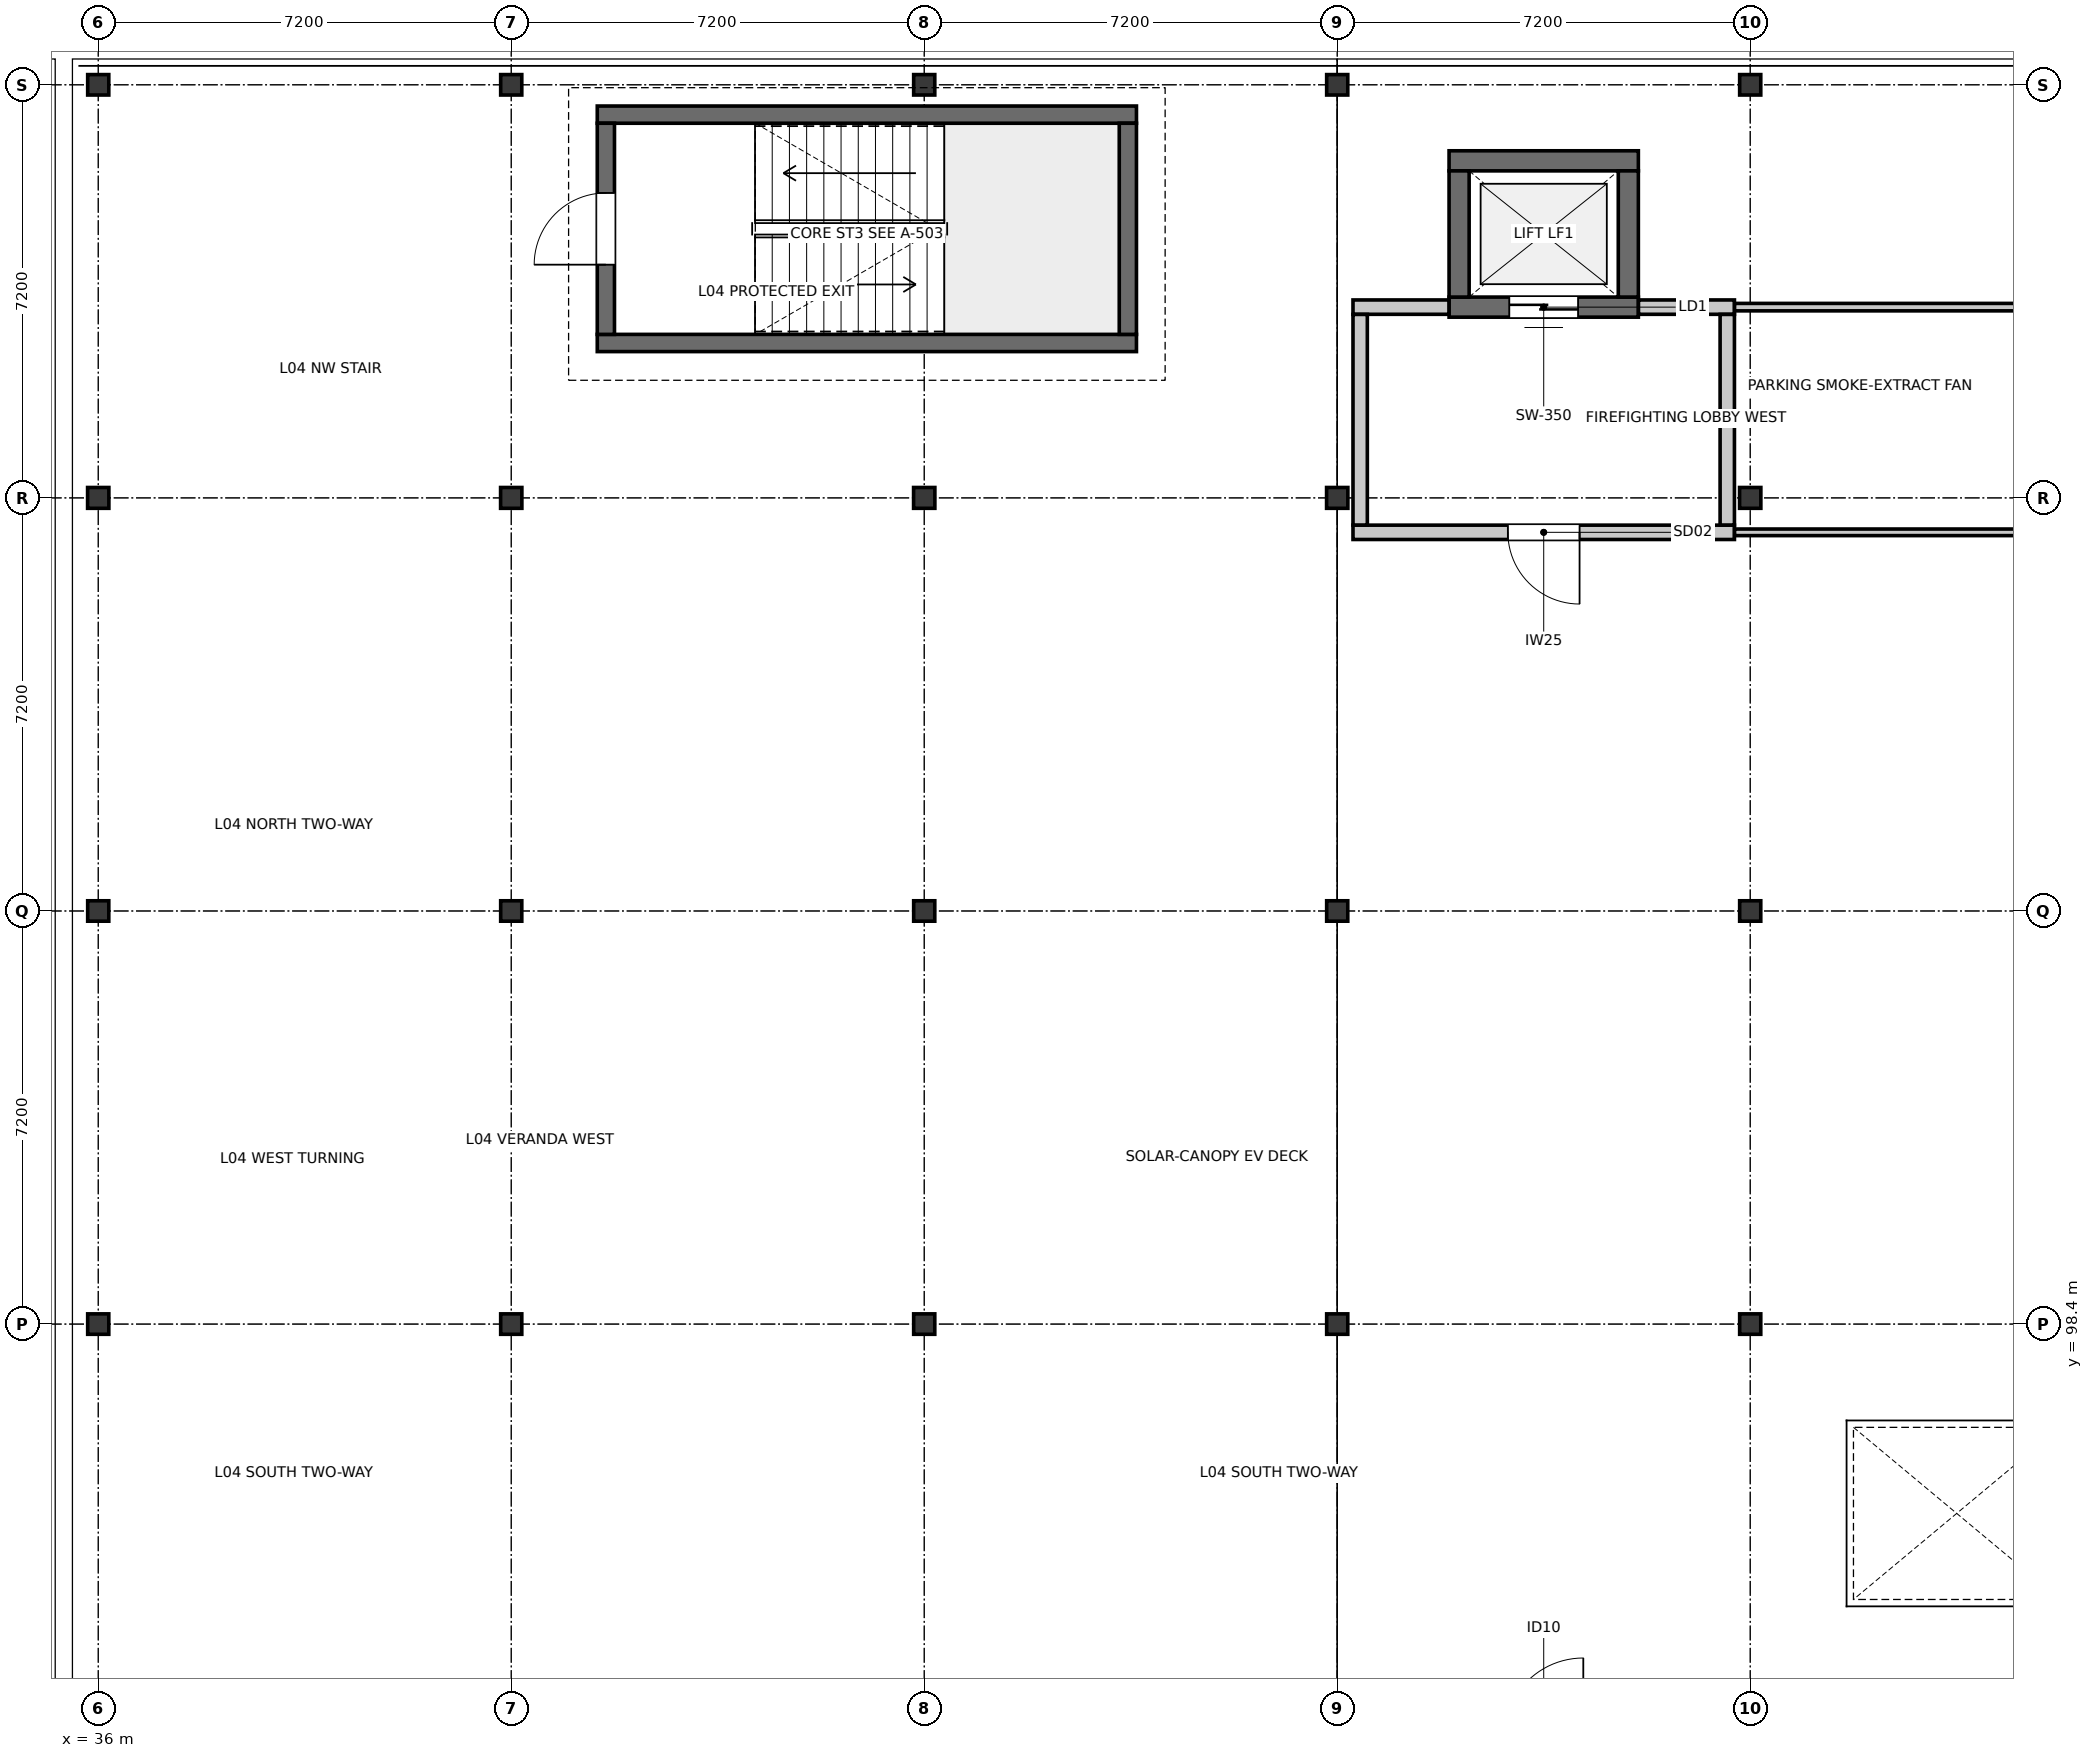
"""IFC4 building model, lengths in metres.
Left out: names, types, materials, properties, quantities, classifications, styles, units other than length and angle.
Written with IfcOpenShell. Run it as: python <this file> out.ifc"""

import sys

from ifc_helpers import new_model, si_unit, direction, frame, frame_2d, origin, origin_2d, place, context, subcontext, project, spatial, rectangle, i_section, extrude, element, fill, save


model = new_model("IFC4")
c1 = context("Model", 3, precision=1e-05, world=origin(), true_north=direction((0.0, 1.0)))
c2 = subcontext(c1, "Body", "Model", "MODEL_VIEW")
j1 = project(units=[si_unit("LENGTHUNIT", "METRE"), si_unit("PLANEANGLEUNIT", "RADIAN")], contexts=[c1])
p1 = place(None, origin())
s1 = spatial("IfcSite", under=j1, at=p1, CompositionType="ELEMENT")
p2 = place(p1, origin())
s2 = spatial("IfcBuilding", under=s1, at=p2, CompositionType="ELEMENT")
p3 = place(p2, frame((0.0, 0.0, 17.1)))
s3 = spatial("IfcBuildingStorey", under=s2, at=p3, CompositionType="ELEMENT", Elevation=17.1)
for number, where, z_axis, x_axis in (
    (1, (36.0, 98.4, 0.0), (0.0, 0.0, 1.0), (1.0, 0.0, 0.0)),
    (2, (36.0, 105.6, 0.0), (0.0, 0.0, 1.0), (1.0, 0.0, 0.0)),
):
    element("IfcColumn", number, at=place(p3, frame(where, z_axis=z_axis, x_axis=x_axis)), inside=s3, PredefinedType="COLUMN", context=c2, shape_type="SweptSolid", body=[
        extrude(i_section(OverallWidth=0.368, OverallDepth=0.356, WebThickness=0.011, FlangeThickness=0.018, FilletRadius=0.015, at=origin_2d()), origin(), (0.0, 0.0, 1.0), 3.9),
    ])
p4 = place(p3, frame((36.0, 112.8, 0.0), z_axis=(0.0, 0.0, 1.0), x_axis=(1.0, 0.0, 0.0)))
e3 = element("IfcColumn", 3, at=p4, inside=s3, PredefinedType="COLUMN", context=c2, shape_type="SweptSolid", body=[
    extrude(i_section(OverallWidth=0.371, OverallDepth=0.363, WebThickness=0.013, FlangeThickness=0.022, FilletRadius=0.015, at=origin_2d()), origin(), (0.0, 0.0, 1.0), 3.9),
])
for number, where, z_axis, x_axis in (
    (4, (36.0, 120.0, 0.0), (0.0, 0.0, 1.0), (1.0, 0.0, 0.0)),
    (5, (43.2, 98.4, 0.0), (0.0, 0.0, 1.0), (1.0, 0.0, 0.0)),
    (6, (43.2, 105.6, 0.0), (0.0, 0.0, 1.0), (1.0, 0.0, 0.0)),
):
    element("IfcColumn", number, at=place(p3, frame(where, z_axis=z_axis, x_axis=x_axis)), inside=s3, PredefinedType="COLUMN", context=c2, shape_type="SweptSolid", body=[
        extrude(i_section(OverallWidth=0.368, OverallDepth=0.356, WebThickness=0.011, FlangeThickness=0.018, FilletRadius=0.015, at=origin_2d()), origin(), (0.0, 0.0, 1.0), 3.9),
    ])
p5 = place(p3, frame((43.2, 112.8, 0.0), z_axis=(0.0, 0.0, 1.0), x_axis=(1.0, 0.0, 0.0)))
e7 = element("IfcColumn", 7, at=p5, inside=s3, PredefinedType="COLUMN", context=c2, shape_type="SweptSolid", body=[
    extrude(i_section(OverallWidth=0.371, OverallDepth=0.363, WebThickness=0.013, FlangeThickness=0.022, FilletRadius=0.015, at=origin_2d()), origin(), (0.0, 0.0, 1.0), 3.9),
])
for number, where, z_axis, x_axis in (
    (8, (43.2, 120.0, 0.0), (0.0, 0.0, 1.0), (1.0, 0.0, 0.0)),
    (9, (50.4, 98.4, 0.0), (0.0, 0.0, 1.0), (1.0, 0.0, 0.0)),
    (10, (50.4, 105.6, 0.0), (0.0, 0.0, 1.0), (1.0, 0.0, 0.0)),
):
    element("IfcColumn", number, at=place(p3, frame(where, z_axis=z_axis, x_axis=x_axis)), inside=s3, PredefinedType="COLUMN", context=c2, shape_type="SweptSolid", body=[
        extrude(i_section(OverallWidth=0.368, OverallDepth=0.356, WebThickness=0.011, FlangeThickness=0.018, FilletRadius=0.015, at=origin_2d()), origin(), (0.0, 0.0, 1.0), 3.9),
    ])
p6 = place(p3, frame((50.4, 112.8, 0.0), z_axis=(0.0, 0.0, 1.0), x_axis=(1.0, 0.0, 0.0)))
e11 = element("IfcColumn", 11, at=p6, inside=s3, PredefinedType="COLUMN", context=c2, shape_type="SweptSolid", body=[
    extrude(i_section(OverallWidth=0.371, OverallDepth=0.363, WebThickness=0.013, FlangeThickness=0.022, FilletRadius=0.015, at=origin_2d()), origin(), (0.0, 0.0, 1.0), 3.9),
])
for number, where, z_axis, x_axis in (
    (12, (50.4, 120.0, 0.0), (0.0, 0.0, 1.0), (1.0, 0.0, 0.0)),
    (13, (57.6, 98.4, 0.0), (0.0, 0.0, 1.0), (1.0, 0.0, 0.0)),
    (14, (57.6, 105.6, 0.0), (0.0, 0.0, 1.0), (1.0, 0.0, 0.0)),
):
    element("IfcColumn", number, at=place(p3, frame(where, z_axis=z_axis, x_axis=x_axis)), inside=s3, PredefinedType="COLUMN", context=c2, shape_type="SweptSolid", body=[
        extrude(i_section(OverallWidth=0.368, OverallDepth=0.356, WebThickness=0.011, FlangeThickness=0.018, FilletRadius=0.015, at=origin_2d()), origin(), (0.0, 0.0, 1.0), 3.9),
    ])
p7 = place(p3, frame((57.6, 112.8, 0.0), z_axis=(0.0, 0.0, 1.0), x_axis=(1.0, 0.0, 0.0)))
e15 = element("IfcColumn", 15, at=p7, inside=s3, PredefinedType="COLUMN", context=c2, shape_type="SweptSolid", body=[
    extrude(i_section(OverallWidth=0.371, OverallDepth=0.363, WebThickness=0.013, FlangeThickness=0.022, FilletRadius=0.015, at=origin_2d()), origin(), (0.0, 0.0, 1.0), 3.9),
])
for number, where, z_axis, x_axis in (
    (16, (57.6, 120.0, 0.0), (0.0, 0.0, 1.0), (1.0, 0.0, 0.0)),
    (17, (64.8, 98.4, 0.0), (0.0, 0.0, 1.0), (1.0, 0.0, 0.0)),
    (18, (64.8, 105.6, 0.0), (0.0, 0.0, 1.0), (1.0, 0.0, 0.0)),
):
    element("IfcColumn", number, at=place(p3, frame(where, z_axis=z_axis, x_axis=x_axis)), inside=s3, PredefinedType="COLUMN", context=c2, shape_type="SweptSolid", body=[
        extrude(i_section(OverallWidth=0.368, OverallDepth=0.356, WebThickness=0.011, FlangeThickness=0.018, FilletRadius=0.015, at=origin_2d()), origin(), (0.0, 0.0, 1.0), 3.9),
    ])
p8 = place(p3, frame((64.8, 112.8, 0.0), z_axis=(0.0, 0.0, 1.0), x_axis=(1.0, 0.0, 0.0)))
e19 = element("IfcColumn", 19, at=p8, inside=s3, PredefinedType="COLUMN", context=c2, shape_type="SweptSolid", body=[
    extrude(i_section(OverallWidth=0.371, OverallDepth=0.363, WebThickness=0.013, FlangeThickness=0.022, FilletRadius=0.015, at=origin_2d()), origin(), (0.0, 0.0, 1.0), 3.9),
])
p9 = place(p3, frame((64.8, 120.0, 0.0), z_axis=(0.0, 0.0, 1.0), x_axis=(1.0, 0.0, 0.0)))
e20 = element("IfcColumn", 20, at=p9, inside=s3, PredefinedType="COLUMN", context=c2, shape_type="SweptSolid", body=[
    extrude(i_section(OverallWidth=0.368, OverallDepth=0.356, WebThickness=0.011, FlangeThickness=0.018, FilletRadius=0.015, at=origin_2d()), origin(), (0.0, 0.0, 1.0), 3.9),
])
for number, where, z_axis, x_axis in (
    (21, (54.1, 115.5, 0.0), (0.0, 0.0, 1.0), (-1.0, 0.0, 0.0)),
    (22, (44.7, 119.48, 0.0), (0.0, 0.0, 1.0), (1.0, 0.0, 0.0)),
):
    element("IfcWall", number, at=place(p3, frame(where, z_axis=z_axis, x_axis=x_axis)), inside=s3, PredefinedType="SOLIDWALL", context=c2, shape_type="SweptSolid", body=[
        extrude(rectangle(XDim=9.4, YDim=0.3, at=frame_2d((4.7, 0.0))), origin(), (0.0, 0.0, 1.0), 3.64),
    ])
p10 = place(p3, frame((44.85, 115.65, 0.0), z_axis=(0.0, 0.0, 1.0), x_axis=(0.0, 1.0, 0.0)))
e23 = element("IfcWall", 23, at=p10, inside=s3, PredefinedType="SOLIDWALL", context=c2, shape_type="SweptSolid", body=[
    extrude(rectangle(XDim=3.68, YDim=0.3, at=frame_2d((1.84, 0.0))), origin(), (0.0, 0.0, 1.0), 3.64),
])
p11 = place(p10, frame((1.215, 0.0, 0.0)))
e24 = element("IfcOpeningElement", 24, at=p11, cuts=e23, PredefinedType="OPENING", context=c2, shape_type="SweptSolid", body=[
    extrude(rectangle(XDim=1.25, YDim=2.2, at=frame_2d((0.625, 1.1))), frame((0.0, 0.16, 0.0), z_axis=(0.0, -1.0, 0.0), x_axis=(1.0, 0.0, 0.0)), (0.0, 0.0, 1.0), 0.32),
])
p12 = place(p3, frame((53.95, 119.33, 0.0), z_axis=(0.0, 0.0, 1.0), x_axis=(0.0, -1.0, 0.0)))
e25 = element("IfcWall", 25, at=p12, inside=s3, PredefinedType="SOLIDWALL", context=c2, shape_type="SweptSolid", body=[
    extrude(rectangle(XDim=3.68, YDim=0.3, at=frame_2d((1.84, 0.0))), origin(), (0.0, 0.0, 1.0), 3.64),
])
p13 = place(p3, frame((62.85, 116.125, 0.0), z_axis=(0.0, 0.0, 1.0), x_axis=(-1.0, 0.0, 0.0)))
e26 = element("IfcWall", 26, at=p13, inside=s3, PredefinedType="SHEAR", context=c2, shape_type="SweptSolid", body=[
    extrude(rectangle(XDim=3.3, YDim=0.35, at=frame_2d((1.65, 0.0))), origin(), (0.0, 0.0, 1.0), 3.64),
])
p14 = place(p13, frame((1.05, 0.0, 0.0)))
e27 = element("IfcOpeningElement", 27, at=p14, cuts=e26, PredefinedType="OPENING", context=c2, shape_type="SweptSolid", body=[
    extrude(rectangle(XDim=1.2, YDim=2.2, at=frame_2d((0.6, 1.1))), frame((0.0, 0.185, 0.0), z_axis=(0.0, -1.0, 0.0), x_axis=(1.0, 0.0, 0.0)), (0.0, 0.0, 1.0), 0.37),
])
p15 = place(p3, frame((59.55, 118.675, 0.0), z_axis=(0.0, 0.0, 1.0), x_axis=(1.0, 0.0, 0.0)))
e28 = element("IfcWall", 28, at=p15, inside=s3, PredefinedType="SHEAR", context=c2, shape_type="SweptSolid", body=[
    extrude(rectangle(XDim=3.3, YDim=0.35, at=frame_2d((1.65, 0.0))), origin(), (0.0, 0.0, 1.0), 3.64),
])
for number, where, z_axis, x_axis in (
    (29, (59.725, 116.3, 0.0), (0.0, 0.0, 1.0), (0.0, 1.0, 0.0)),
    (30, (62.675, 118.5, 0.0), (0.0, 0.0, 1.0), (0.0, -1.0, 0.0)),
):
    element("IfcWall", number, at=place(p3, frame(where, z_axis=z_axis, x_axis=x_axis)), inside=s3, PredefinedType="SHEAR", context=c2, shape_type="SweptSolid", body=[
        extrude(rectangle(XDim=2.2, YDim=0.35, at=frame_2d((1.1, 0.0))), origin(), (0.0, 0.0, 1.0), 3.64),
    ])
p16 = place(p3, frame((64.525, 112.2, 0.0), z_axis=(0.0, 0.0, 1.0), x_axis=(-1.0, 0.0, 0.0)))
e31 = element("IfcWall", 31, at=p16, inside=s3, PredefinedType="PARTITIONING", context=c2, shape_type="SweptSolid", body=[
    extrude(rectangle(XDim=6.65, YDim=0.25, at=frame_2d((3.325, 0.0))), origin(), (0.0, 0.0, 1.0), 2.863),
])
p17 = place(p16, frame((2.7, 0.0, 0.0)))
e32 = element("IfcOpeningElement", 32, at=p17, cuts=e31, PredefinedType="OPENING", context=c2, shape_type="SweptSolid", body=[
    extrude(rectangle(XDim=1.25, YDim=2.2, at=frame_2d((0.625, 1.1))), frame((0.0, 0.135, 0.0), z_axis=(0.0, -1.0, 0.0), x_axis=(1.0, 0.0, 0.0)), (0.0, 0.0, 1.0), 0.27),
])
p18 = place(p3, frame((57.875, 116.125, 0.0), z_axis=(0.0, 0.0, 1.0), x_axis=(1.0, 0.0, 0.0)))
e33 = element("IfcWall", 33, at=p18, inside=s3, PredefinedType="PARTITIONING", context=c2, shape_type="SweptSolid", body=[
    extrude(rectangle(XDim=1.673, YDim=0.25, at=frame_2d((0.836, 0.0))), origin(), (0.0, 0.0, 1.0), 2.863),
])
p19 = place(p3, frame((62.852, 116.125, 0.0), z_axis=(0.0, 0.0, 1.0), x_axis=(1.0, 0.0, 0.0)))
e34 = element("IfcWall", 34, at=p19, inside=s3, PredefinedType="PARTITIONING", context=c2, shape_type="SweptSolid", body=[
    extrude(rectangle(XDim=1.673, YDim=0.25, at=frame_2d((0.836, 0.0))), origin(), (0.0, 0.0, 1.0), 2.863),
])
for number, where, z_axis, x_axis in (
    (35, (58.0, 112.327, 0.0), (0.0, 0.0, 1.0), (0.0, 1.0, 0.0)),
    (36, (64.4, 115.998, 0.0), (0.0, 0.0, 1.0), (0.0, -1.0, 0.0)),
):
    element("IfcWall", number, at=place(p3, frame(where, z_axis=z_axis, x_axis=x_axis)), inside=s3, PredefinedType="PARTITIONING", context=c2, shape_type="SweptSolid", body=[
        extrude(rectangle(XDim=3.671, YDim=0.25, at=frame_2d((1.835, 0.0))), origin(), (0.0, 0.0, 1.0), 2.863),
    ])
p20 = place(p3, frame((79.28, 112.2, 0.0), z_axis=(0.0, 0.0, 1.0), x_axis=(-1.0, 0.0, 0.0)))
e37 = element("IfcWall", 37, at=p20, inside=s3, PredefinedType="PARTITIONING", context=c2, shape_type="SweptSolid", body=[
    extrude(rectangle(XDim=14.753, YDim=0.115, at=frame_2d((7.376, 0.0))), origin(), (0.0, 0.0, 1.0), 2.863),
])
p21 = place(p20, frame((8.007, 0.0, 0.0)))
e38 = element("IfcOpeningElement", 38, at=p21, cuts=e37, PredefinedType="OPENING", context=c2, shape_type="SweptSolid", body=[
    extrude(rectangle(XDim=1.54, YDim=2.1, at=frame_2d((0.77, 1.05))), frame((0.0, 0.067, 0.0), z_axis=(0.0, -1.0, 0.0), x_axis=(1.0, 0.0, 0.0)), (0.0, 0.0, 1.0), 0.135),
])
p22 = place(p3, frame((64.527, 116.125, 0.0), z_axis=(0.0, 0.0, 1.0), x_axis=(1.0, 0.0, 0.0)))
e39 = element("IfcWall", 39, at=p22, inside=s3, PredefinedType="PARTITIONING", context=c2, shape_type="SweptSolid", body=[
    extrude(rectangle(XDim=14.753, YDim=0.13, at=frame_2d((7.376, 0.0))), origin(), (0.0, 0.0, 1.0), 2.863),
])
p23 = place(p11, origin())
e40 = element("IfcDoor", 40, at=p23, inside=s3, OperationType="SINGLE_SWING_LEFT", PredefinedType="DOOR", context=c2, shape_type="SweptSolid", body=[
    extrude(rectangle(XDim=1.25, YDim=2.2, at=frame_2d((0.625, 1.1))), frame((0.0, 0.025, 0.0), z_axis=(0.0, -1.0, 0.0), x_axis=(1.0, 0.0, 0.0)), (0.0, 0.0, 1.0), 0.05),
])
fill(e24, e40)
p24 = place(p14, origin())
e41 = element("IfcDoor", 41, at=p24, inside=s3, OperationType="DOUBLE_DOOR_SLIDING", PredefinedType="DOOR", context=c2, shape_type="SweptSolid", body=[
    extrude(rectangle(XDim=1.2, YDim=2.2, at=frame_2d((0.6, 1.1))), frame((0.0, 0.025, 0.0), z_axis=(0.0, -1.0, 0.0), x_axis=(1.0, 0.0, 0.0)), (0.0, 0.0, 1.0), 0.05),
])
fill(e27, e41)
p25 = place(p17, origin())
e42 = element("IfcDoor", 42, at=p25, inside=s3, OperationType="SINGLE_SWING_LEFT", PredefinedType="DOOR", context=c2, shape_type="SweptSolid", body=[
    extrude(rectangle(XDim=1.25, YDim=2.2, at=frame_2d((0.625, 1.1))), frame((0.0, 0.025, 0.0), z_axis=(0.0, -1.0, 0.0), x_axis=(1.0, 0.0, 0.0)), (0.0, 0.0, 1.0), 0.05),
])
fill(e32, e42)
save(model, sys.argv[1])
